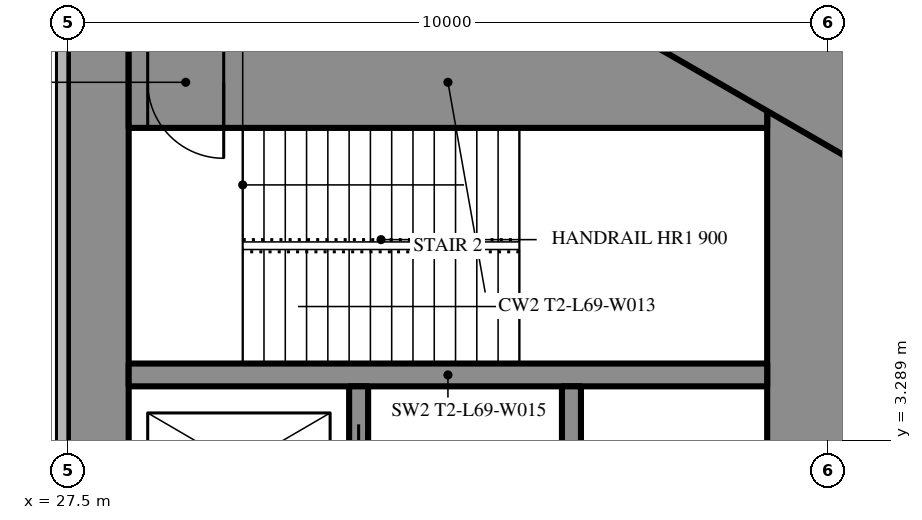
"""IFC4 building model, lengths in metres.
Left out: names, types, materials, properties, quantities, classifications, styles, units other than length and angle.
Written with IfcOpenShell. Run it as: python <this file> out.ifc"""

import sys

from ifc_helpers import new_model, si_unit, direction, frame, frame_2d, origin, place, context, subcontext, project, spatial, rectangle, extrude, element, fill, save


model = new_model("IFC4")
c1 = context("Model", 3, precision=1e-05, world=origin(), true_north=direction((0.0, 1.0)))
c2 = subcontext(c1, "Body", "Model", "MODEL_VIEW")
j1 = project(units=[si_unit("LENGTHUNIT", "METRE"), si_unit("PLANEANGLEUNIT", "RADIAN")], contexts=[c1])
p1 = place(None, origin())
s1 = spatial("IfcSite", under=j1, at=p1, CompositionType="ELEMENT")
p2 = place(p1, origin())
s2 = spatial("IfcBuilding", under=s1, at=p2, CompositionType="ELEMENT")
p3 = place(p2, frame((0.0, 0.0, 263.3)))
s3 = spatial("IfcBuildingStorey", under=s2, at=p3, CompositionType="ELEMENT", Elevation=263.3)
p4 = place(p3, frame((27.9, -8.6, 0.0), z_axis=(0.0, 0.0, 1.0), x_axis=(0.0, 1.0, 0.0)))
e1 = element("IfcWall", 1, at=p4, inside=s3, PredefinedType="SHEAR", context=c2, shape_type="SweptSolid", body=[
    extrude(rectangle(XDim=17.2, YDim=0.8, at=frame_2d((8.6, 0.0))), origin(), (0.0, 0.0, 1.0), 5.0),
])
p5 = place(p4, frame((9.35, 0.0, 0.0)))
e2 = element("IfcOpeningElement", 2, at=p5, cuts=e1, PredefinedType="OPENING", context=c2, shape_type="SweptSolid", body=[
    extrude(rectangle(XDim=0.9, YDim=2.2, at=frame_2d((0.45, 1.1))), frame((0.0, 0.41, 0.0), z_axis=(0.0, -1.0, 0.0), x_axis=(1.0, 0.0, 0.0)), (0.0, 0.0, 1.0), 0.82),
])
p6 = place(p3, frame((37.3, -8.6, 0.0), z_axis=(0.0, 0.0, 1.0), x_axis=(0.0, 1.0, 0.0)))
e3 = element("IfcWall", 3, at=p6, inside=s3, PredefinedType="SHEAR", context=c2, shape_type="SweptSolid", body=[
    extrude(rectangle(XDim=17.2, YDim=1.2, at=frame_2d((8.6, 0.0))), origin(), (0.0, 0.0, 1.0), 5.0),
])
p7 = place(p6, frame((7.7, 0.0, 0.0)))
e4 = element("IfcOpeningElement", 4, at=p7, cuts=e3, PredefinedType="OPENING", context=c2, shape_type="SweptSolid", body=[
    extrude(rectangle(XDim=1.8, YDim=2.2, at=frame_2d((0.9, 1.1))), frame((0.0, 0.61, 0.0), z_axis=(0.0, -1.0, 0.0), x_axis=(1.0, 0.0, 0.0)), (0.0, 0.0, 1.0), 1.22),
])
p8 = place(p3, frame((28.3, 8.0, 0.0), z_axis=(0.0, 0.0, 1.0), x_axis=(1.0, 0.0, 0.0)))
e5 = element("IfcWall", 5, at=p8, inside=s3, PredefinedType="SHEAR", context=c2, shape_type="SweptSolid", body=[
    extrude(rectangle(XDim=8.4, YDim=1.2, at=frame_2d((4.2, 0.0))), origin(), (0.0, 0.0, 1.0), 5.0),
])
p9 = place(p8, frame((0.25, 0.0, 0.0)))
e6 = element("IfcOpeningElement", 6, at=p9, cuts=e5, PredefinedType="OPENING", context=c2, shape_type="SweptSolid", body=[
    extrude(rectangle(XDim=1.0, YDim=2.2, at=frame_2d((0.5, 1.1))), frame((0.0, 0.61, 0.0), z_axis=(0.0, -1.0, 0.0), x_axis=(1.0, 0.0, 0.0)), (0.0, 0.0, 1.0), 1.22),
])
p10 = place(p3, frame((28.3, 4.15, 0.0), z_axis=(0.0, 0.0, 1.0), x_axis=(1.0, 0.0, 0.0)))
e7 = element("IfcWall", 7, at=p10, inside=s3, PredefinedType="SHEAR", context=c2, shape_type="SweptSolid", body=[
    extrude(rectangle(XDim=8.4, YDim=0.3, at=frame_2d((4.2, 0.0))), origin(), (0.0, 0.0, 1.0), 5.0),
])
p11 = place(p3, frame((31.325, 1.9, 0.0), z_axis=(0.0, 0.0, 1.0), x_axis=(0.0, 1.0, 0.0)))
e8 = element("IfcWall", 8, at=p11, inside=s3, PredefinedType="SHEAR", context=c2, shape_type="SweptSolid", body=[
    extrude(rectangle(XDim=2.1, YDim=0.25, at=frame_2d((1.05, 0.0))), origin(), (0.0, 0.0, 1.0), 5.0),
])
p12 = place(p11, frame((0.5, 0.0, 0.0)))
e9 = element("IfcOpeningElement", 9, at=p12, cuts=e8, PredefinedType="OPENING", context=c2, shape_type="SweptSolid", body=[
    extrude(rectangle(XDim=1.1, YDim=2.2, at=frame_2d((0.55, 1.1))), frame((0.0, 0.135, 0.0), z_axis=(0.0, -1.0, 0.0), x_axis=(1.0, 0.0, 0.0)), (0.0, 0.0, 1.0), 0.27),
])
p13 = place(p3, frame((34.125, 1.65, 0.0), z_axis=(0.0, 0.0, 1.0), x_axis=(0.0, 1.0, 0.0)))
e10 = element("IfcWall", 10, at=p13, inside=s3, PredefinedType="SHEAR", context=c2, shape_type="SweptSolid", body=[
    extrude(rectangle(XDim=2.35, YDim=0.25, at=frame_2d((1.175, 0.0))), origin(), (0.0, 0.0, 1.0), 5.0),
])
p14 = place(p3, frame((27.2, 13.8, 0.0), z_axis=(0.0, 0.0, 1.0), x_axis=(0.866024515034, -0.500001539357, 0.0)))
e11 = element("IfcWall", 11, at=p14, inside=s3, PredefinedType="SHEAR", context=c2, shape_type="SweptSolid", body=[
    extrude(rectangle(XDim=26.907, YDim=1.2, at=frame_2d((13.454, 0.0))), origin(), (0.0, 0.0, 1.0), 5.0),
])
p15 = place(p14, frame((4.6, 0.0, 0.0)))
e12 = element("IfcOpeningElement", 12, at=p15, cuts=e11, PredefinedType="OPENING", context=c2, shape_type="SweptSolid", body=[
    extrude(rectangle(XDim=1.0, YDim=2.2, at=frame_2d((0.5, 1.1))), frame((0.0, 0.61, 0.0), z_axis=(0.0, -1.0, 0.0), x_axis=(1.0, 0.0, 0.0)), (0.0, 0.0, 1.0), 1.22),
])
p16 = place(p14, frame((13.395, 0.0, 0.0)))
e13 = element("IfcOpeningElement", 13, at=p16, cuts=e11, PredefinedType="OPENING", context=c2, shape_type="SweptSolid", body=[
    extrude(rectangle(XDim=1.8, YDim=2.2, at=frame_2d((0.9, 1.1))), frame((0.0, 0.61, 0.0), z_axis=(0.0, -1.0, 0.0), x_axis=(1.0, 0.0, 0.0)), (0.0, 0.0, 1.0), 1.22),
])
p17 = place(p3, frame((28.959, 15.44, 0.0), z_axis=(0.0, 0.0, 1.0), x_axis=(0.866027378611, -0.499996579484, 0.0)))
e14 = element("IfcWall", 14, at=p17, inside=s3, PredefinedType="PARTITIONING", context=c2, shape_type="SweptSolid", body=[
    extrude(rectangle(XDim=30.76, YDim=0.2, at=frame_2d((15.38, 0.0))), origin(), (0.0, 0.0, 1.0), 4.75),
])
p18 = place(p17, frame((26.032, 0.0, 0.0)))
e15 = element("IfcOpeningElement", 15, at=p18, cuts=e14, PredefinedType="OPENING", context=c2, shape_type="SweptSolid", body=[
    extrude(rectangle(XDim=2.0, YDim=2.4, at=frame_2d((1.0, 1.2))), frame((0.0, 0.11, 0.0), z_axis=(0.0, -1.0, 0.0), x_axis=(1.0, 0.0, 0.0)), (0.0, 0.0, 1.0), 0.22),
])
p19 = place(p17, frame((20.587, 0.0, 0.0)))
e16 = element("IfcOpeningElement", 16, at=p19, cuts=e14, PredefinedType="OPENING", context=c2, shape_type="SweptSolid", body=[
    extrude(rectangle(XDim=2.0, YDim=2.4, at=frame_2d((1.0, 1.2))), frame((0.0, 0.11, 0.0), z_axis=(0.0, -1.0, 0.0), x_axis=(1.0, 0.0, 0.0)), (0.0, 0.0, 1.0), 0.22),
])
p20 = place(p17, frame((16.704, 0.0, 0.0)))
e17 = element("IfcOpeningElement", 17, at=p20, cuts=e14, PredefinedType="OPENING", context=c2, shape_type="SweptSolid", body=[
    extrude(rectangle(XDim=2.0, YDim=2.4, at=frame_2d((1.0, 1.2))), frame((0.0, 0.11, 0.0), z_axis=(0.0, -1.0, 0.0), x_axis=(1.0, 0.0, 0.0)), (0.0, 0.0, 1.0), 0.22),
])
p21 = place(p17, frame((6.994, 0.0, 0.0)))
e18 = element("IfcOpeningElement", 18, at=p21, cuts=e14, PredefinedType="OPENING", context=c2, shape_type="SweptSolid", body=[
    extrude(rectangle(XDim=2.0, YDim=2.4, at=frame_2d((1.0, 1.2))), frame((0.0, 0.11, 0.0), z_axis=(0.0, -1.0, 0.0), x_axis=(1.0, 0.0, 0.0)), (0.0, 0.0, 1.0), 0.22),
])
p22 = place(p9, origin())
e19 = element("IfcDoor", 19, at=p22, inside=s3, OperationType="SINGLE_SWING_RIGHT", PredefinedType="DOOR", context=c2, shape_type="SweptSolid", body=[
    extrude(rectangle(XDim=1.0, YDim=2.2, at=frame_2d((0.5, 1.1))), frame((0.0, 0.025, 0.0), z_axis=(0.0, -1.0, 0.0), x_axis=(1.0, 0.0, 0.0)), (0.0, 0.0, 1.0), 0.05),
])
fill(e6, e19)
p23 = place(p12, origin())
e20 = element("IfcDoor", 20, at=p23, inside=s3, OperationType="SLIDING_TO_LEFT", PredefinedType="USERDEFINED", context=c2, shape_type="SweptSolid", body=[
    extrude(rectangle(XDim=1.1, YDim=2.2, at=frame_2d((0.55, 1.1))), frame((0.0, 0.025, 0.0), z_axis=(0.0, -1.0, 0.0), x_axis=(1.0, 0.0, 0.0)), (0.0, 0.0, 1.0), 0.05),
])
fill(e9, e20)
save(model, sys.argv[1])
